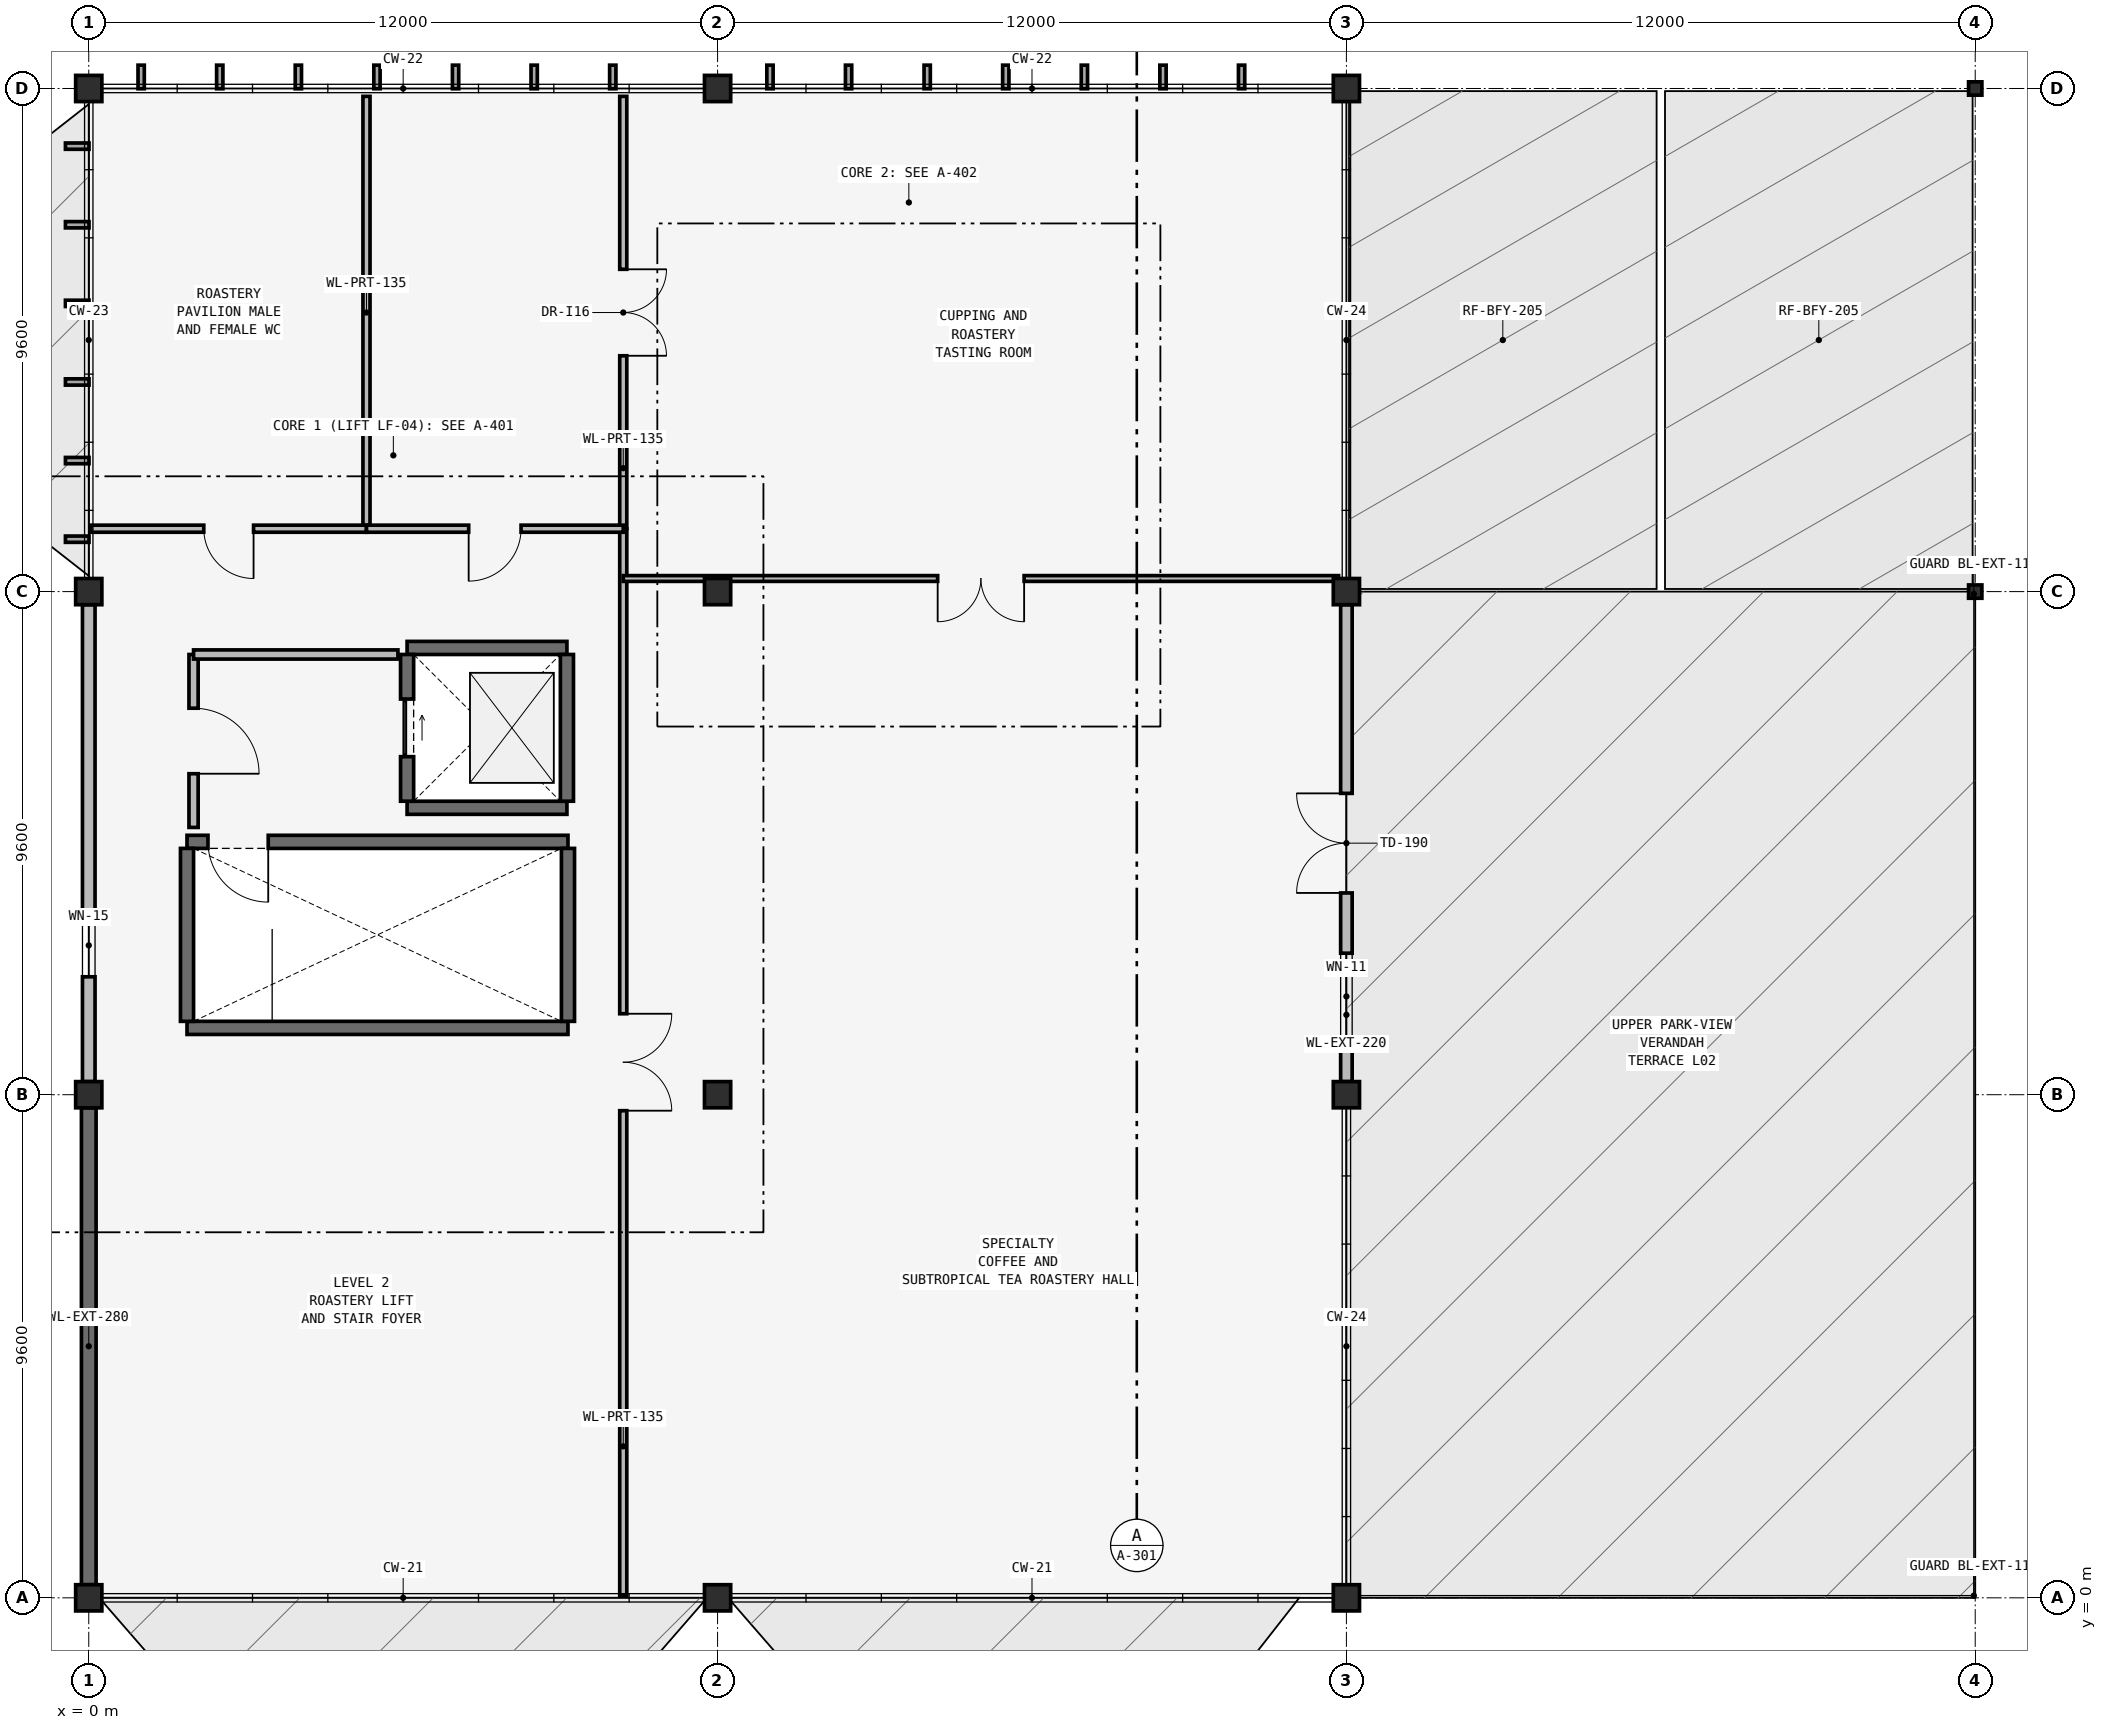
"""IFC4 building model, lengths in metres.
Left out: names, types, materials, properties, quantities, classifications, styles, units other than length and angle.
Written with IfcOpenShell. Run it as: python <this file> out.ifc"""

import sys

from ifc_helpers import new_model, si_unit, direction, frame, frame_2d, origin, origin_2d, place, context, subcontext, project, spatial, rectangle, i_section, extrude, element, fill, save


model = new_model("IFC4")
c1 = context("Model", 3, precision=1e-05, world=origin(), true_north=direction((0.0, 1.0)))
c2 = subcontext(c1, "Body", "Model", "MODEL_VIEW")
j1 = project(units=[si_unit("LENGTHUNIT", "METRE"), si_unit("PLANEANGLEUNIT", "RADIAN")], contexts=[c1])
p1 = place(None, origin())
s1 = spatial("IfcSite", under=j1, at=p1, CompositionType="ELEMENT")
p2 = place(p1, origin())
s2 = spatial("IfcBuilding", under=s1, at=p2, CompositionType="ELEMENT")
p3 = place(p2, frame((0.0, 0.0, 10.2)))
s3 = spatial("IfcBuildingStorey", under=s2, at=p3, CompositionType="ELEMENT", Elevation=10.2)
for number, where, z_axis, x_axis in (
    (1, (0.0, 0.0, 0.0), (0.0, 0.0, 1.0), (1.0, 0.0, 0.0)),
    (2, (12.0, 0.0, 0.0), (0.0, 0.0, 1.0), (1.0, 0.0, 0.0)),
    (3, (24.0, 0.0, 0.0), (0.0, 0.0, 1.0), (1.0, 0.0, 0.0)),
    (4, (0.0, 9.6, 0.0), (0.0, 0.0, 1.0), (1.0, 0.0, 0.0)),
    (5, (12.0, 9.6, 0.0), (0.0, 0.0, 1.0), (1.0, 0.0, 0.0)),
    (6, (24.0, 9.6, 0.0), (0.0, 0.0, 1.0), (1.0, 0.0, 0.0)),
    (7, (0.0, 19.2, 0.0), (0.0, 0.0, 1.0), (1.0, 0.0, 0.0)),
    (8, (12.0, 19.2, 0.0), (0.0, 0.0, 1.0), (1.0, 0.0, 0.0)),
    (9, (24.0, 19.2, 0.0), (0.0, 0.0, 1.0), (1.0, 0.0, 0.0)),
    (10, (0.0, 28.8, 0.0), (0.0, 0.0, 1.0), (1.0, 0.0, 0.0)),
    (11, (12.0, 28.8, 0.0), (0.0, 0.0, 1.0), (1.0, 0.0, 0.0)),
    (12, (24.0, 28.8, 0.0), (0.0, 0.0, 1.0), (1.0, 0.0, 0.0)),
):
    element("IfcColumn", number, at=place(p3, frame(where, z_axis=z_axis, x_axis=x_axis)), inside=s3, PredefinedType="COLUMN", context=c2, shape_type="SweptSolid", body=[
        extrude(rectangle(XDim=0.5, YDim=0.5, at=origin_2d()), origin(), (0.0, 0.0, 1.0), 4.2),
    ])
for number, where, z_axis, x_axis in (
    (13, (36.0, 19.2, 0.0), (0.0, 0.0, 1.0), (1.0, 0.0, 0.0)),
    (14, (36.0, 28.8, 0.0), (0.0, 0.0, 1.0), (1.0, 0.0, 0.0)),
):
    element("IfcColumn", number, at=place(p3, frame(where, z_axis=z_axis, x_axis=x_axis)), inside=s3, PredefinedType="COLUMN", context=c2, shape_type="SweptSolid", body=[
        extrude(i_section(OverallWidth=0.254, OverallDepth=0.254, WebThickness=0.009, FlangeThickness=0.014, at=origin_2d()), origin(), (0.0, 0.0, 1.0), 2.14),
    ])
p4 = place(p3, frame((0.0, 0.25, 0.0), z_axis=(0.0, 0.0, 1.0), x_axis=(0.0, 1.0, 0.0)))
e15 = element("IfcWall", 15, at=p4, inside=s3, PredefinedType="SOLIDWALL", context=c2, shape_type="SweptSolid", body=[
    extrude(rectangle(XDim=9.1, YDim=0.28, at=frame_2d((4.55, 0.0))), origin(), (0.0, 0.0, 1.0), 3.9),
])
p5 = place(p3, frame((0.0, 9.85, 0.0), z_axis=(0.0, 0.0, 1.0), x_axis=(0.0, 1.0, 0.0)))
e16 = element("IfcWall", 16, at=p5, inside=s3, PredefinedType="SOLIDWALL", context=c2, shape_type="SweptSolid", body=[
    extrude(rectangle(XDim=9.1, YDim=0.24, at=frame_2d((4.55, 0.0))), origin(), (0.0, 0.0, 1.0), 3.326),
])
p6 = place(p5, frame((2.0, 0.0, 1.1)))
e17 = element("IfcOpeningElement", 17, at=p6, cuts=e16, PredefinedType="OPENING", context=c2, shape_type="SweptSolid", body=[
    extrude(rectangle(XDim=1.2, YDim=1.5, at=frame_2d((0.6, 0.75))), frame((0.0, 0.135, 0.0), z_axis=(0.0, -1.0, 0.0), x_axis=(1.0, 0.0, 0.0)), (0.0, 0.0, 1.0), 0.27),
])
p7 = place(p3, frame((24.0, 9.85, 0.0), z_axis=(0.0, 0.0, 1.0), x_axis=(0.0, 1.0, 0.0)))
e18 = element("IfcWall", 18, at=p7, inside=s3, PredefinedType="SOLIDWALL", context=c2, shape_type="SweptSolid", body=[
    extrude(rectangle(XDim=9.1, YDim=0.22, at=frame_2d((4.55, 0.0))), origin(), (0.0, 0.0, 1.0), 3.443),
])
p8 = place(p7, frame((3.6, 0.0, 0.0)))
e19 = element("IfcOpeningElement", 19, at=p8, cuts=e18, PredefinedType="OPENING", context=c2, shape_type="SweptSolid", body=[
    extrude(rectangle(XDim=1.9, YDim=2.25, at=frame_2d((0.95, 1.125))), frame((0.0, 0.125, 0.0), z_axis=(0.0, -1.0, 0.0), x_axis=(1.0, 0.0, 0.0)), (0.0, 0.0, 1.0), 0.25),
])
p9 = place(p7, frame((0.8, 0.0, 0.8)))
e20 = element("IfcOpeningElement", 20, at=p9, cuts=e18, PredefinedType="OPENING", context=c2, shape_type="SweptSolid", body=[
    extrude(rectangle(XDim=1.65, YDim=2.1, at=frame_2d((0.825, 1.05))), frame((0.0, 0.125, 0.0), z_axis=(0.0, -1.0, 0.0), x_axis=(1.0, 0.0, 0.0)), (0.0, 0.0, 1.0), 0.25),
])
p10 = place(p3, frame((1.875, 10.875, 0.0), z_axis=(0.0, 0.0, 1.0), x_axis=(1.0, 0.0, 0.0)))
e21 = element("IfcWall", 21, at=p10, inside=s3, PredefinedType="SHEAR", context=c2, shape_type="SweptSolid", body=[
    extrude(rectangle(XDim=7.27, YDim=0.25, at=frame_2d((3.635, 0.0))), origin(), (0.0, 0.0, 1.0), 3.94),
])
p11 = place(p3, frame((1.875, 14.425, 0.0), z_axis=(0.0, 0.0, 1.0), x_axis=(1.0, 0.0, 0.0)))
e22 = element("IfcWall", 22, at=p11, inside=s3, PredefinedType="SHEAR", context=c2, shape_type="SweptSolid", body=[
    extrude(rectangle(XDim=7.27, YDim=0.25, at=frame_2d((3.635, 0.0))), origin(), (0.0, 0.0, 1.0), 3.94),
])
p12 = place(p11, frame((0.4, 0.0, 0.0)))
e23 = element("IfcOpeningElement", 23, at=p12, cuts=e22, PredefinedType="OPENING", context=c2, shape_type="SweptSolid", body=[
    extrude(rectangle(XDim=1.15, YDim=2.15, at=frame_2d((0.575, 1.075))), frame((0.0, 0.14, 0.0), z_axis=(0.0, -1.0, 0.0), x_axis=(1.0, 0.0, 0.0)), (0.0, 0.0, 1.0), 0.28),
])
for number, where, z_axis, x_axis in (
    (24, (1.875, 11.0, 0.0), (0.0, 0.0, 1.0), (0.0, 1.0, 0.0)),
    (25, (9.145, 11.0, 0.0), (0.0, 0.0, 1.0), (0.0, 1.0, 0.0)),
):
    element("IfcWall", number, at=place(p3, frame(where, z_axis=z_axis, x_axis=x_axis)), inside=s3, PredefinedType="SHEAR", context=c2, shape_type="SweptSolid", body=[
        extrude(rectangle(XDim=3.3, YDim=0.25, at=frame_2d((1.65, 0.0))), origin(), (0.0, 0.0, 1.0), 3.94),
    ])
for number, where, z_axis, x_axis in (
    (26, (6.075, 15.075, 0.0), (0.0, 0.0, 1.0), (1.0, 0.0, 0.0)),
    (27, (6.075, 18.125, 0.0), (0.0, 0.0, 1.0), (1.0, 0.0, 0.0)),
):
    element("IfcWall", number, at=place(p3, frame(where, z_axis=z_axis, x_axis=x_axis)), inside=s3, PredefinedType="SHEAR", context=c2, shape_type="SweptSolid", body=[
        extrude(rectangle(XDim=3.05, YDim=0.25, at=frame_2d((1.525, 0.0))), origin(), (0.0, 0.0, 1.0), 3.94),
    ])
p13 = place(p3, frame((9.125, 15.2, 0.0), z_axis=(0.0, 0.0, 1.0), x_axis=(0.0, 1.0, 0.0)))
e28 = element("IfcWall", 28, at=p13, inside=s3, PredefinedType="SHEAR", context=c2, shape_type="SweptSolid", body=[
    extrude(rectangle(XDim=2.8, YDim=0.25, at=frame_2d((1.4, 0.0))), origin(), (0.0, 0.0, 1.0), 3.94),
])
p14 = place(p3, frame((6.075, 15.2, 0.0), z_axis=(0.0, 0.0, 1.0), x_axis=(0.0, 1.0, 0.0)))
e29 = element("IfcWall", 29, at=p14, inside=s3, PredefinedType="SHEAR", context=c2, shape_type="SweptSolid", body=[
    extrude(rectangle(XDim=2.8, YDim=0.25, at=frame_2d((1.4, 0.0))), origin(), (0.0, 0.0, 1.0), 3.94),
])
p15 = place(p14, frame((0.85, 0.0, 0.0)))
e30 = element("IfcOpeningElement", 30, at=p15, cuts=e29, PredefinedType="OPENING", context=c2, shape_type="SweptSolid", body=[
    extrude(rectangle(XDim=1.1, YDim=2.15, at=frame_2d((0.55, 1.075))), frame((0.0, 0.14, 0.0), z_axis=(0.0, -1.0, 0.0), x_axis=(1.0, 0.0, 0.0)), (0.0, 0.0, 1.0), 0.28),
])
p16 = place(p3, frame((2.0, 14.7, 0.0), z_axis=(0.0, 0.0, 1.0), x_axis=(0.0, 1.0, 0.0)))
e31 = element("IfcWall", 31, at=p16, inside=s3, PredefinedType="PARTITIONING", context=c2, shape_type="SweptSolid", body=[
    extrude(rectangle(XDim=3.3, YDim=0.175, at=frame_2d((1.65, 0.0))), origin(), (0.0, 0.0, 1.0), 3.94),
])
p17 = place(p16, frame((1.025, 0.0, 0.0)))
e32 = element("IfcOpeningElement", 32, at=p17, cuts=e31, PredefinedType="OPENING", context=c2, shape_type="SweptSolid", body=[
    extrude(rectangle(XDim=1.25, YDim=2.2, at=frame_2d((0.625, 1.1))), frame((0.0, 0.103, 0.0), z_axis=(0.0, -1.0, 0.0), x_axis=(1.0, 0.0, 0.0)), (0.0, 0.0, 1.0), 0.205),
])
p18 = place(p3, frame((2.0, 18.0, 0.0), z_axis=(0.0, 0.0, 1.0), x_axis=(1.0, 0.0, 0.0)))
e33 = element("IfcWall", 33, at=p18, inside=s3, PredefinedType="PARTITIONING", context=c2, shape_type="SweptSolid", body=[
    extrude(rectangle(XDim=3.9, YDim=0.175, at=frame_2d((1.95, 0.0))), origin(), (0.0, 0.0, 1.0), 3.94),
])
p19 = place(p3, frame((10.2, 0.04, 0.0), z_axis=(0.0, 0.0, 1.0), x_axis=(0.0, 1.0, 0.0)))
e34 = element("IfcWall", 34, at=p19, inside=s3, PredefinedType="PARTITIONING", context=c2, shape_type="SweptSolid", body=[
    extrude(rectangle(XDim=20.36, YDim=0.135, at=frame_2d((10.18, 0.0))), origin(), (0.0, 0.0, 1.0), 3.94),
])
p20 = place(p19, frame((9.255, 0.0, 0.0)))
e35 = element("IfcOpeningElement", 35, at=p20, cuts=e34, PredefinedType="OPENING", context=c2, shape_type="SweptSolid", body=[
    extrude(rectangle(XDim=1.85, YDim=2.2, at=frame_2d((0.925, 1.1))), frame((0.0, 0.083, 0.0), z_axis=(0.0, -1.0, 0.0), x_axis=(1.0, 0.0, 0.0)), (0.0, 0.0, 1.0), 0.165),
])
p21 = place(p3, frame((10.2, 19.45, 0.0), z_axis=(0.0, 0.0, 1.0), x_axis=(1.0, 0.0, 0.0)))
e36 = element("IfcWall", 36, at=p21, inside=s3, PredefinedType="MOVABLE", context=c2, shape_type="SweptSolid", body=[
    extrude(rectangle(XDim=13.65, YDim=0.11, at=frame_2d((6.825, 0.0))), origin(), (0.0, 0.0, 1.0), 3.94),
])
p22 = place(p21, frame((6.0, 0.0, 0.0)))
e37 = element("IfcOpeningElement", 37, at=p22, cuts=e36, PredefinedType="OPENING", context=c2, shape_type="SweptSolid", body=[
    extrude(rectangle(XDim=1.65, YDim=2.2, at=frame_2d((0.825, 1.1))), frame((0.0, 0.07, 0.0), z_axis=(0.0, -1.0, 0.0), x_axis=(1.0, 0.0, 0.0)), (0.0, 0.0, 1.0), 0.14),
])
p23 = place(p3, frame((10.2, 20.4, 0.0), z_axis=(0.0, 0.0, 1.0), x_axis=(0.0, 1.0, 0.0)))
e38 = element("IfcWall", 38, at=p23, inside=s3, PredefinedType="PARTITIONING", context=c2, shape_type="SweptSolid", body=[
    extrude(rectangle(XDim=8.25, YDim=0.135, at=frame_2d((4.125, 0.0))), origin(), (0.0, 0.0, 1.0), 3.94),
])
p24 = place(p23, frame((3.3, 0.0, 0.0)))
e39 = element("IfcOpeningElement", 39, at=p24, cuts=e38, PredefinedType="OPENING", context=c2, shape_type="SweptSolid", body=[
    extrude(rectangle(XDim=1.65, YDim=2.2, at=frame_2d((0.825, 1.1))), frame((0.0, 0.083, 0.0), z_axis=(0.0, -1.0, 0.0), x_axis=(1.0, 0.0, 0.0)), (0.0, 0.0, 1.0), 0.165),
])
p25 = place(p3, frame((5.3, 20.4, 0.0), z_axis=(0.0, 0.0, 1.0), x_axis=(0.0, 1.0, 0.0)))
e40 = element("IfcWall", 40, at=p25, inside=s3, PredefinedType="PARTITIONING", context=c2, shape_type="SweptSolid", body=[
    extrude(rectangle(XDim=8.25, YDim=0.135, at=frame_2d((4.125, 0.0))), origin(), (0.0, 0.0, 1.0), 3.94),
])
p26 = place(p3, frame((0.04, 20.4, 0.0), z_axis=(0.0, 0.0, 1.0), x_axis=(1.0, 0.0, 0.0)))
e41 = element("IfcWall", 41, at=p26, inside=s3, PredefinedType="PARTITIONING", context=c2, shape_type="SweptSolid", body=[
    extrude(rectangle(XDim=5.26, YDim=0.135, at=frame_2d((2.63, 0.0))), origin(), (0.0, 0.0, 1.0), 3.94),
])
p27 = place(p26, frame((2.155, 0.0, 0.0)))
e42 = element("IfcOpeningElement", 42, at=p27, cuts=e41, PredefinedType="OPENING", context=c2, shape_type="SweptSolid", body=[
    extrude(rectangle(XDim=0.95, YDim=2.1, at=frame_2d((0.475, 1.05))), frame((0.0, 0.083, 0.0), z_axis=(0.0, -1.0, 0.0), x_axis=(1.0, 0.0, 0.0)), (0.0, 0.0, 1.0), 0.165),
])
p28 = place(p3, frame((5.3, 20.4, 0.0), z_axis=(0.0, 0.0, 1.0), x_axis=(1.0, 0.0, 0.0)))
e43 = element("IfcWall", 43, at=p28, inside=s3, PredefinedType="PARTITIONING", context=c2, shape_type="SweptSolid", body=[
    extrude(rectangle(XDim=4.9, YDim=0.135, at=frame_2d((2.45, 0.0))), origin(), (0.0, 0.0, 1.0), 3.94),
])
p29 = place(p28, frame((1.95, 0.0, 0.0)))
e44 = element("IfcOpeningElement", 44, at=p29, cuts=e43, PredefinedType="OPENING", context=c2, shape_type="SweptSolid", body=[
    extrude(rectangle(XDim=1.0, YDim=2.1, at=frame_2d((0.5, 1.05))), frame((0.0, 0.083, 0.0), z_axis=(0.0, -1.0, 0.0), x_axis=(1.0, 0.0, 0.0)), (0.0, 0.0, 1.0), 0.165),
])
p30 = place(p6, origin())
e45 = element("IfcWindow", 45, at=p30, inside=s3, PartitioningType="SINGLE_PANEL", PredefinedType="WINDOW", context=c2, shape_type="SweptSolid", body=[
    extrude(rectangle(XDim=1.2, YDim=1.5, at=frame_2d((0.6, 0.75))), frame((0.0, 0.03, 0.0), z_axis=(0.0, -1.0, 0.0), x_axis=(1.0, 0.0, 0.0)), (0.0, 0.0, 1.0), 0.06),
])
fill(e17, e45)
p31 = place(p8, frame((1.9, 0.0, 0.0), z_axis=(0.0, 0.0, 1.0), x_axis=(-1.0, 0.0, 0.0)))
e46 = element("IfcDoor", 46, at=p31, inside=s3, OperationType="DOUBLE_DOOR_SINGLE_SWING", PredefinedType="DOOR", context=c2, shape_type="SweptSolid", body=[
    extrude(rectangle(XDim=1.9, YDim=2.25, at=frame_2d((0.95, 1.125))), frame((0.0, 0.025, 0.0), z_axis=(0.0, -1.0, 0.0), x_axis=(1.0, 0.0, 0.0)), (0.0, 0.0, 1.0), 0.05),
])
fill(e19, e46)
p32 = place(p9, origin())
e47 = element("IfcWindow", 47, at=p32, inside=s3, PartitioningType="SINGLE_PANEL", PredefinedType="WINDOW", context=c2, shape_type="SweptSolid", body=[
    extrude(rectangle(XDim=1.65, YDim=2.1, at=frame_2d((0.825, 1.05))), frame((0.0, 0.03, 0.0), z_axis=(0.0, -1.0, 0.0), x_axis=(1.0, 0.0, 0.0)), (0.0, 0.0, 1.0), 0.06),
])
fill(e20, e47)
p33 = place(p12, frame((1.15, 0.0, 0.0), z_axis=(0.0, 0.0, 1.0), x_axis=(-1.0, 0.0, 0.0)))
e48 = element("IfcDoor", 48, at=p33, inside=s3, OperationType="SINGLE_SWING_RIGHT", PredefinedType="DOOR", context=c2, shape_type="SweptSolid", body=[
    extrude(rectangle(XDim=1.15, YDim=2.15, at=frame_2d((0.575, 1.075))), frame((0.0, 0.025, 0.0), z_axis=(0.0, -1.0, 0.0), x_axis=(1.0, 0.0, 0.0)), (0.0, 0.0, 1.0), 0.05),
])
fill(e23, e48)
p34 = place(p15, origin())
e49 = element("IfcDoor", 49, at=p34, inside=s3, OperationType="SLIDING_TO_LEFT", PredefinedType="DOOR", context=c2, shape_type="SweptSolid", body=[
    extrude(rectangle(XDim=1.1, YDim=2.15, at=frame_2d((0.55, 1.075))), frame((0.0, 0.025, 0.0), z_axis=(0.0, -1.0, 0.0), x_axis=(1.0, 0.0, 0.0)), (0.0, 0.0, 1.0), 0.05),
])
fill(e30, e49)
p35 = place(p17, frame((1.25, 0.0, 0.0), z_axis=(0.0, 0.0, 1.0), x_axis=(-1.0, 0.0, 0.0)))
e50 = element("IfcDoor", 50, at=p35, inside=s3, OperationType="SINGLE_SWING_LEFT", PredefinedType="DOOR", context=c2, shape_type="SweptSolid", body=[
    extrude(rectangle(XDim=1.25, YDim=2.2, at=frame_2d((0.625, 1.1))), frame((0.0, 0.025, 0.0), z_axis=(0.0, -1.0, 0.0), x_axis=(1.0, 0.0, 0.0)), (0.0, 0.0, 1.0), 0.05),
])
fill(e32, e50)
p36 = place(p20, origin())
e51 = element("IfcDoor", 51, at=p36, inside=s3, OperationType="DOUBLE_DOOR_SINGLE_SWING", PredefinedType="DOOR", context=c2, shape_type="SweptSolid", body=[
    extrude(rectangle(XDim=1.85, YDim=2.2, at=frame_2d((0.925, 1.1))), frame((0.0, 0.025, 0.0), z_axis=(0.0, -1.0, 0.0), x_axis=(1.0, 0.0, 0.0)), (0.0, 0.0, 1.0), 0.05),
])
fill(e35, e51)
p37 = place(p22, origin())
e52 = element("IfcDoor", 52, at=p37, inside=s3, OperationType="DOUBLE_DOOR_SINGLE_SWING", PredefinedType="DOOR", context=c2, shape_type="SweptSolid", body=[
    extrude(rectangle(XDim=1.65, YDim=2.2, at=frame_2d((0.825, 1.1))), frame((0.0, 0.025, 0.0), z_axis=(0.0, -1.0, 0.0), x_axis=(1.0, 0.0, 0.0)), (0.0, 0.0, 1.0), 0.05),
])
fill(e37, e52)
p38 = place(p24, origin())
e53 = element("IfcDoor", 53, at=p38, inside=s3, OperationType="DOUBLE_DOOR_SINGLE_SWING", PredefinedType="DOOR", context=c2, shape_type="SweptSolid", body=[
    extrude(rectangle(XDim=1.65, YDim=2.2, at=frame_2d((0.825, 1.1))), frame((0.0, 0.025, 0.0), z_axis=(0.0, -1.0, 0.0), x_axis=(1.0, 0.0, 0.0)), (0.0, 0.0, 1.0), 0.05),
])
fill(e39, e53)
p39 = place(p27, origin())
e54 = element("IfcDoor", 54, at=p39, inside=s3, OperationType="SINGLE_SWING_RIGHT", PredefinedType="DOOR", context=c2, shape_type="SweptSolid", body=[
    extrude(rectangle(XDim=0.95, YDim=2.1, at=frame_2d((0.475, 1.05))), frame((0.0, 0.025, 0.0), z_axis=(0.0, -1.0, 0.0), x_axis=(1.0, 0.0, 0.0)), (0.0, 0.0, 1.0), 0.05),
])
fill(e42, e54)
p40 = place(p29, origin())
e55 = element("IfcDoor", 55, at=p40, inside=s3, OperationType="SINGLE_SWING_LEFT", PredefinedType="DOOR", context=c2, shape_type="SweptSolid", body=[
    extrude(rectangle(XDim=1.0, YDim=2.1, at=frame_2d((0.5, 1.05))), frame((0.0, 0.025, 0.0), z_axis=(0.0, -1.0, 0.0), x_axis=(1.0, 0.0, 0.0)), (0.0, 0.0, 1.0), 0.05),
])
fill(e44, e55)
save(model, sys.argv[1])
